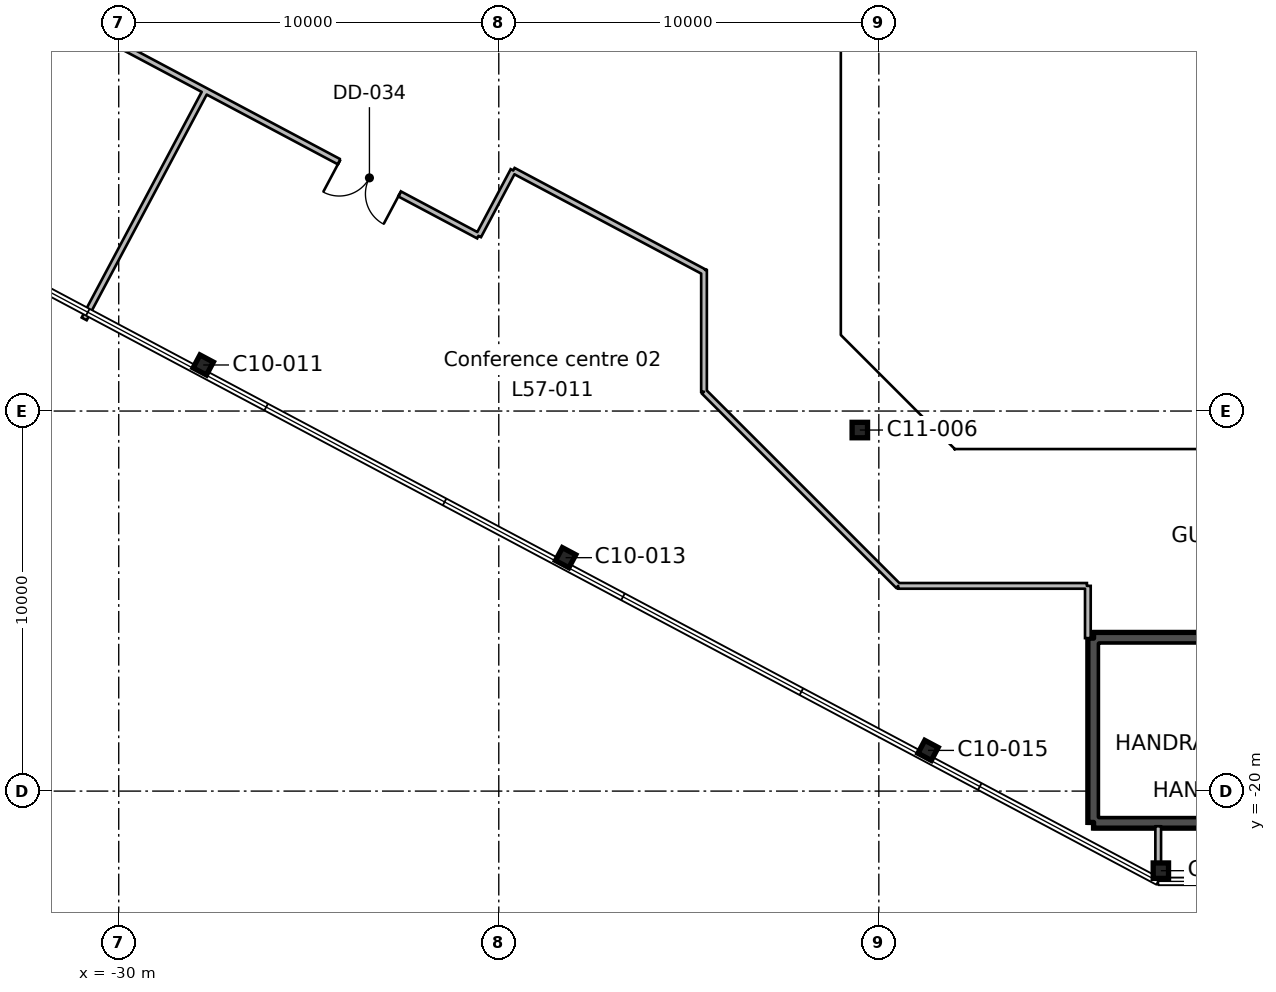
"""IFC4 building model, lengths in metres.
Left out: names, types, materials, properties, quantities, classifications, styles, units other than length and angle.
Written with IfcOpenShell. Run it as: python <this file> out.ifc"""

import sys

from ifc_helpers import new_model, si_unit, direction, frame, frame_2d, origin, origin_2d, place, context, subcontext, project, spatial, rectangle, hollow_rectangle, i_section, extrude, element, fill, save


model = new_model("IFC4")
c1 = context("Model", 3, precision=1e-05, world=origin(), true_north=direction((0.0, 1.0)))
c2 = subcontext(c1, "Body", "Model", "MODEL_VIEW")
j1 = project(units=[si_unit("LENGTHUNIT", "METRE"), si_unit("PLANEANGLEUNIT", "RADIAN")], contexts=[c1])
p1 = place(None, origin())
s1 = spatial("IfcSite", under=j1, at=p1, CompositionType="ELEMENT")
p2 = place(p1, origin())
s2 = spatial("IfcBuilding", under=s1, at=p2, CompositionType="ELEMENT")
p3 = place(p2, frame((0.0, 0.0, 258.0)))
s3 = spatial("IfcBuildingStorey", under=s2, at=p3, CompositionType="ELEMENT", Elevation=258.0)
p4 = place(p3, frame((-2.579, -22.094, 0.0), z_axis=(0.0, 0.0, 1.0), x_axis=(1.0, 0.0, 0.0)))
e1 = element("IfcColumn", 1, at=p4, inside=s3, PredefinedType="COLUMN", context=c2, shape_type="SweptSolid", body=[
    extrude(i_section(OverallWidth=0.404, OverallDepth=0.406, WebThickness=0.027, FlangeThickness=0.044, FilletRadius=0.015, at=origin_2d()), origin(), (0.0, 0.0, 1.0), 3.9),
])
for number, where, z_axis, x_axis in (
    (2, (-8.705, -18.929, 0.0), (0.0, 0.0, 1.0), (0.883, -0.469, 0.0)),
    (3, (-18.241, -13.858, 0.0), (0.0, 0.0, 1.0), (0.883, -0.469, 0.0)),
):
    element("IfcColumn", number, at=place(p3, frame(where, z_axis=z_axis, x_axis=x_axis)), inside=s3, PredefinedType="COLUMN", context=c2, shape_type="SweptSolid", body=[
        extrude(i_section(OverallWidth=0.399, OverallDepth=0.386, WebThickness=0.021, FlangeThickness=0.033, FilletRadius=0.015, at=origin_2d()), origin(), (0.0, 0.0, 1.0), 3.9),
    ])
p5 = place(p3, frame((-10.5, -10.5, 0.0), z_axis=(0.0, 0.0, 1.0), x_axis=(1.0, 0.0, 0.0)))
e4 = element("IfcColumn", 4, at=p5, inside=s3, PredefinedType="COLUMN", context=c2, shape_type="SweptSolid", body=[
    extrude(hollow_rectangle(XDim=0.406, YDim=0.406, WallThickness=0.009, InnerFilletRadius=0.004, OuterFilletRadius=0.013, at=origin_2d()), origin(), (0.0, 0.0, 1.0), 3.9),
])
p6 = place(p3, frame((-27.777, -8.788, 0.0), z_axis=(0.0, 0.0, 1.0), x_axis=(0.882947592859, -0.469471562786, 0.0)))
e5 = element("IfcColumn", 5, at=p6, inside=s3, PredefinedType="COLUMN", context=c2, shape_type="SweptSolid", body=[
    extrude(i_section(OverallWidth=0.399, OverallDepth=0.386, WebThickness=0.021, FlangeThickness=0.033, FilletRadius=0.015, at=origin_2d()), origin(), (0.0, 0.0, 1.0), 3.9),
])
p7 = place(p3, frame((3.95, -20.825, 0.0), z_axis=(0.0, 0.0, 1.0), x_axis=(-1.0, 0.0, 0.0)))
e6 = element("IfcWall", 6, at=p7, inside=s3, PredefinedType="SHEAR", context=c2, shape_type="SweptSolid", body=[
    extrude(rectangle(XDim=8.3, YDim=0.3, at=frame_2d((4.15, 0.0))), origin(), (0.0, 0.0, 1.0), 3.9),
])
p8 = place(p3, frame((-4.35, -20.825, 0.0), z_axis=(0.0, 0.0, 1.0), x_axis=(0.0, 1.0, 0.0)))
e7 = element("IfcWall", 7, at=p8, inside=s3, PredefinedType="SHEAR", context=c2, shape_type="SweptSolid", body=[
    extrude(rectangle(XDim=4.85, YDim=0.3, at=frame_2d((2.425, 0.0))), origin(), (0.0, 0.0, 1.0), 3.9),
])
p9 = place(p3, frame((-4.35, -15.975, 0.0), z_axis=(0.0, 0.0, 1.0), x_axis=(1.0, 0.0, 0.0)))
e8 = element("IfcWall", 8, at=p9, inside=s3, PredefinedType="SHEAR", context=c2, shape_type="SweptSolid", body=[
    extrude(rectangle(XDim=8.3, YDim=0.3, at=frame_2d((4.15, 0.0))), origin(), (0.0, 0.0, 1.0), 3.9),
])
p10 = place(p9, frame((6.05, 0.0, 0.0)))
e9 = element("IfcOpeningElement", 9, at=p10, cuts=e8, PredefinedType="OPENING", context=c2, shape_type="SweptSolid", body=[
    extrude(rectangle(XDim=1.9, YDim=2.1, at=frame_2d((0.95, 1.05))), frame((0.0, 0.16, 0.0), z_axis=(0.0, -1.0, 0.0), x_axis=(1.0, 0.0, 0.0)), (0.0, 0.0, 1.0), 0.32),
])
p11 = place(p3, frame((-27.716, -1.572, 0.0), z_axis=(0.0, 0.0, 1.0), x_axis=(-0.469533184863, -0.882914825061, 0.0)))
e10 = element("IfcWall", 10, at=p11, inside=s3, PredefinedType="PARTITIONING", context=c2, shape_type="SweptSolid", body=[
    extrude(rectangle(XDim=6.8, YDim=0.15, at=frame_2d((3.4, 0.0))), origin(), (0.0, 0.0, 1.0), 3.54),
])
p12 = place(p3, frame((-26.332, -2.308, 0.0), z_axis=(0.0, 0.0, 1.0), x_axis=(-0.882934651009, 0.469495902056, 0.0)))
e11 = element("IfcWall", 11, at=p12, inside=s3, PredefinedType="PARTITIONING", context=c2, shape_type="SweptSolid", body=[
    extrude(rectangle(XDim=21.236, YDim=0.15, at=frame_2d((10.618, 0.0))), origin(), (0.0, 0.0, 1.0), 3.54),
])
p13 = place(p12, frame((10.15, 0.0, 0.0)))
e12 = element("IfcOpeningElement", 12, at=p13, cuts=e11, PredefinedType="OPENING", context=c2, shape_type="SweptSolid", body=[
    extrude(rectangle(XDim=1.0, YDim=2.1, at=frame_2d((0.5, 1.05))), frame((0.0, 0.085, 0.0), z_axis=(0.0, -1.0, 0.0), x_axis=(1.0, 0.0, 0.0)), (0.0, 0.0, 1.0), 0.17),
])
p14 = place(p3, frame((-19.62, -3.671, 0.0), z_axis=(0.0, 0.0, 1.0), x_axis=(-0.46913689781, -0.883125456044, 0.0)))
e13 = element("IfcWall", 13, at=p14, inside=s3, PredefinedType="PARTITIONING", context=c2, shape_type="SweptSolid", body=[
    extrude(rectangle(XDim=1.948, YDim=0.15, at=frame_2d((0.974, 0.0))), origin(), (0.0, 0.0, 1.0), 3.54),
])
p15 = place(p3, frame((-20.534, -5.391, 0.0), z_axis=(0.0, 0.0, 1.0), x_axis=(-0.882940924319, 0.46948410427, 0.0)))
e14 = element("IfcWall", 14, at=p15, inside=s3, PredefinedType="PARTITIONING", context=c2, shape_type="SweptSolid", body=[
    extrude(rectangle(XDim=6.567, YDim=0.15, at=frame_2d((3.283, 0.0))), origin(), (0.0, 0.0, 1.0), 3.54),
])
p16 = place(p15, frame((2.35, 0.0, 0.0)))
e15 = element("IfcOpeningElement", 15, at=p16, cuts=e14, PredefinedType="OPENING", context=c2, shape_type="SweptSolid", body=[
    extrude(rectangle(XDim=1.8, YDim=2.1, at=frame_2d((0.9, 1.05))), frame((0.0, 0.085, 0.0), z_axis=(0.0, -1.0, 0.0), x_axis=(1.0, 0.0, 0.0)), (0.0, 0.0, 1.0), 0.17),
])
p17 = place(p3, frame((-19.619, -3.669, 0.0), z_axis=(0.0, 0.0, 1.0), x_axis=(0.882918229391, -0.469526783271, 0.0)))
e16 = element("IfcWall", 16, at=p17, inside=s3, PredefinedType="PARTITIONING", context=c2, shape_type="SweptSolid", body=[
    extrude(rectangle(XDim=5.684, YDim=0.15, at=frame_2d((2.842, 0.0))), origin(), (0.0, 0.0, 1.0), 3.54),
])
p18 = place(p3, frame((-4.525, -14.6, 0.0), z_axis=(0.0, 0.0, 1.0), x_axis=(-1.0, 0.0, 0.0)))
e17 = element("IfcWall", 17, at=p18, inside=s3, PredefinedType="PARTITIONING", context=c2, shape_type="SweptSolid", body=[
    extrude(rectangle(XDim=4.966, YDim=0.15, at=frame_2d((2.483, 0.0))), origin(), (0.0, 0.0, 1.0), 3.54),
])
p19 = place(p3, frame((-9.491, -14.6, 0.0), z_axis=(0.0, 0.0, 1.0), x_axis=(-0.707106781187, 0.707106781187, 0.0)))
e18 = element("IfcWall", 18, at=p19, inside=s3, PredefinedType="PARTITIONING", context=c2, shape_type="SweptSolid", body=[
    extrude(rectangle(XDim=7.225, YDim=0.15, at=frame_2d((3.613, 0.0))), origin(), (0.0, 0.0, 1.0), 3.54),
])
p20 = place(p3, frame((-14.6, -9.491, 0.0), z_axis=(0.0, 0.0, 1.0), x_axis=(0.0, 1.0, 0.0)))
e19 = element("IfcWall", 19, at=p20, inside=s3, PredefinedType="PARTITIONING", context=c2, shape_type="SweptSolid", body=[
    extrude(rectangle(XDim=3.203, YDim=0.15, at=frame_2d((1.602, 0.0))), origin(), (0.0, 0.0, 1.0), 3.54),
])
p21 = place(p3, frame((-4.5, -15.975, 0.0), z_axis=(0.0, 0.0, 1.0), x_axis=(0.0, 1.0, 0.0)))
e20 = element("IfcWall", 20, at=p21, inside=s3, PredefinedType="PARTITIONING", context=c2, shape_type="SweptSolid", body=[
    extrude(rectangle(XDim=1.375, YDim=0.15, at=frame_2d((0.688, 0.0))), origin(), (0.0, 0.0, 1.0), 3.54),
])
p22 = place(p3, frame((-2.649, -20.925, 0.0), z_axis=(0.0, 0.0, 1.0), x_axis=(0.0, -1.0, 0.0)))
e21 = element("IfcWall", 21, at=p22, inside=s3, PredefinedType="PARTITIONING", context=c2, shape_type="SweptSolid", body=[
    extrude(rectangle(XDim=0.966, YDim=0.15, at=frame_2d((0.483, 0.0))), origin(), (0.0, 0.0, 1.0), 3.54),
])
p23 = place(p16, origin())
e22 = element("IfcDoor", 22, at=p23, inside=s3, OperationType="DOUBLE_DOOR_SINGLE_SWING", PredefinedType="DOOR", context=c2, shape_type="SweptSolid", body=[
    extrude(rectangle(XDim=1.8, YDim=2.1, at=frame_2d((0.9, 1.05))), frame((0.0, 0.025, 0.0), z_axis=(0.0, -1.0, 0.0), x_axis=(1.0, 0.0, 0.0)), (0.0, 0.0, 1.0), 0.05),
])
fill(e15, e22)
save(model, sys.argv[1])
